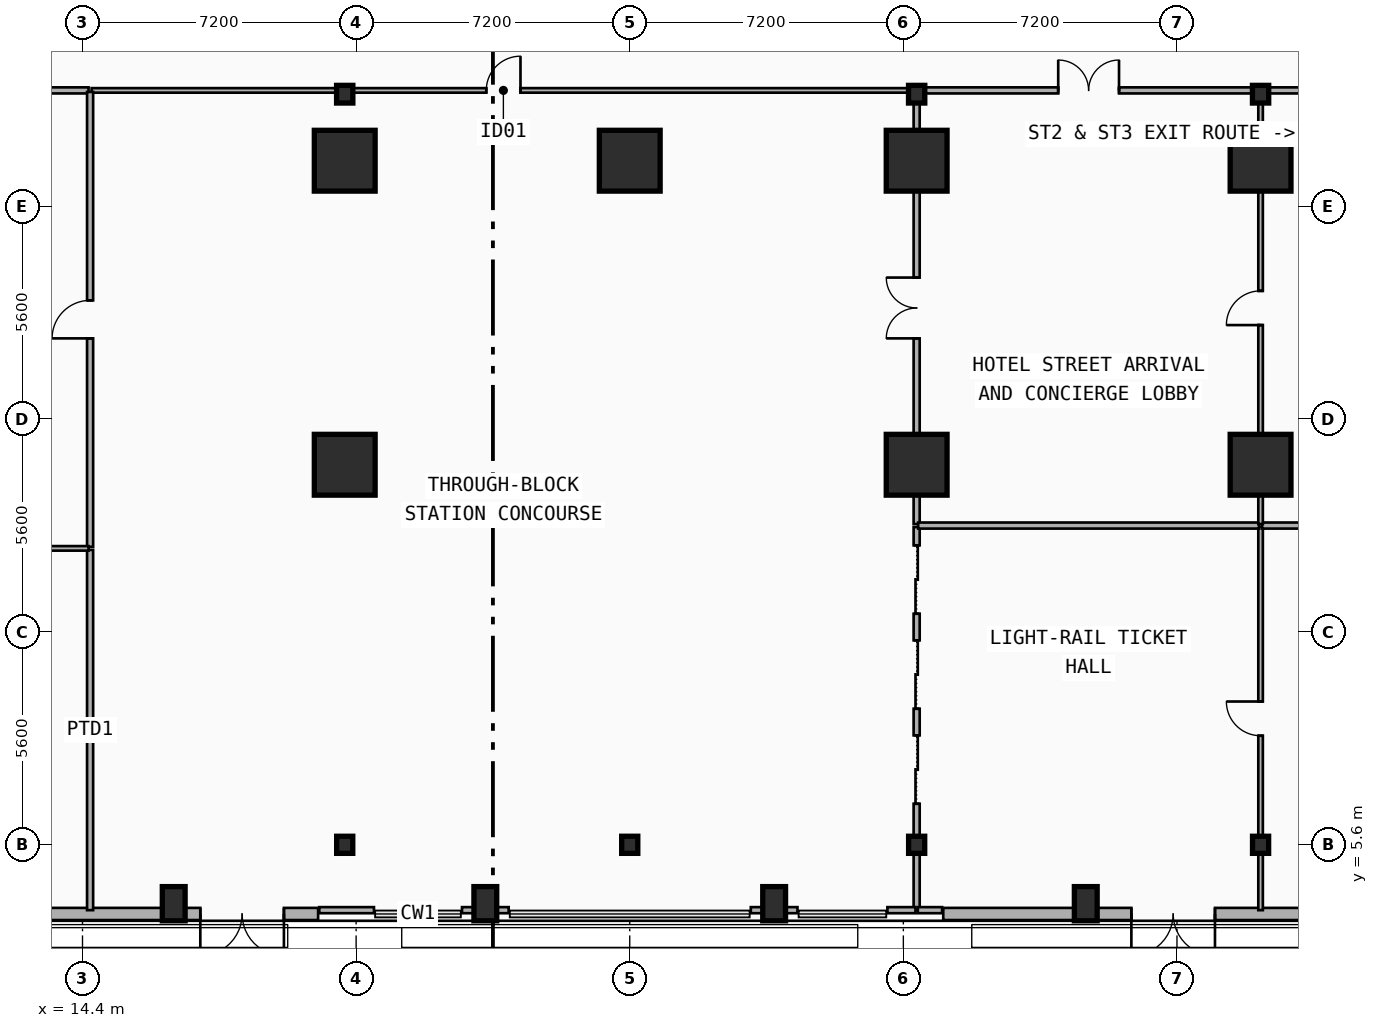
"""IFC4 building model, lengths in metres.
Left out: names, types, materials, properties, quantities, classifications, styles, units other than length and angle.
Written with IfcOpenShell. Run it as: python <this file> out.ifc"""

import sys

from ifc_helpers import new_model, si_unit, direction, frame, frame_2d, origin, origin_2d, place, context, subcontext, project, spatial, rectangle, i_section, extrude, element, fill, save


model = new_model("IFC4")
c1 = context("Model", 3, precision=1e-05, world=origin(), true_north=direction((0.0, 1.0)))
c2 = subcontext(c1, "Body", "Model", "MODEL_VIEW")
j1 = project(units=[si_unit("LENGTHUNIT", "METRE"), si_unit("PLANEANGLEUNIT", "RADIAN")], contexts=[c1])
p1 = place(None, origin())
s1 = spatial("IfcSite", under=j1, at=p1, CompositionType="ELEMENT")
p2 = place(p1, origin())
s2 = spatial("IfcBuilding", under=s1, at=p2, CompositionType="ELEMENT")
p3 = place(p2, origin())
s3 = spatial("IfcBuildingStorey", under=s2, at=p3, CompositionType="ELEMENT", Elevation=0.0)
for number, where, z_axis, x_axis in (
    (1, (21.3, 25.35, 0.0), (0.0, 0.0, 1.0), (1.0, 0.0, 0.0)),
    (2, (36.35, 25.35, 0.0), (0.0, 0.0, 1.0), (1.0, 0.0, 0.0)),
    (3, (45.4, 25.35, 0.0), (0.0, 0.0, 1.0), (1.0, 0.0, 0.0)),
):
    element("IfcColumn", number, at=place(p3, frame(where, z_axis=z_axis, x_axis=x_axis)), inside=s3, PredefinedType="COLUMN", context=c2, shape_type="SweptSolid", body=[
        extrude(i_section(OverallWidth=0.428, OverallDepth=0.465, WebThickness=0.045, FlangeThickness=0.073, FilletRadius=0.015, at=origin_2d()), origin(), (0.0, 0.0, 1.0), 5.4),
    ])
p4 = place(p3, frame((21.3, 5.6, 0.0), z_axis=(0.0, 0.0, 1.0), x_axis=(1.0, 0.0, 0.0)))
e4 = element("IfcColumn", 4, at=p4, inside=s3, PredefinedType="COLUMN", context=c2, shape_type="SweptSolid", body=[
    extrude(i_section(OverallWidth=0.424, OverallDepth=0.45, WebThickness=0.041, FlangeThickness=0.065, FilletRadius=0.015, at=origin_2d()), origin(), (0.0, 0.0, 1.0), 5.4),
])
for number, where, z_axis, x_axis in (
    (5, (21.3, 15.6, 0.0), (0.0, 0.0, 1.0), (1.0, 0.0, 0.0)),
    (6, (21.3, 23.6, 0.0), (0.0, 0.0, 1.0), (1.0, 0.0, 0.0)),
):
    element("IfcColumn", number, at=place(p3, frame(where, z_axis=z_axis, x_axis=x_axis)), inside=s3, PredefinedType="COLUMN", context=c2, shape_type="SweptSolid", body=[
        extrude(rectangle(XDim=1.6, YDim=1.6, at=origin_2d()), origin(), (0.0, 0.0, 1.0), 5.4),
    ])
p5 = place(p3, frame((28.8, 5.6, 0.0), z_axis=(0.0, 0.0, 1.0), x_axis=(1.0, 0.0, 0.0)))
e7 = element("IfcColumn", 7, at=p5, inside=s3, PredefinedType="COLUMN", context=c2, shape_type="SweptSolid", body=[
    extrude(i_section(OverallWidth=0.424, OverallDepth=0.45, WebThickness=0.041, FlangeThickness=0.065, FilletRadius=0.015, at=origin_2d()), origin(), (0.0, 0.0, 1.0), 5.4),
])
p6 = place(p3, frame((28.8, 23.6, 0.0), z_axis=(0.0, 0.0, 1.0), x_axis=(1.0, 0.0, 0.0)))
e8 = element("IfcColumn", 8, at=p6, inside=s3, PredefinedType="COLUMN", context=c2, shape_type="SweptSolid", body=[
    extrude(rectangle(XDim=1.6, YDim=1.6, at=origin_2d()), origin(), (0.0, 0.0, 1.0), 5.4),
])
p7 = place(p3, frame((36.35, 5.6, 0.0), z_axis=(0.0, 0.0, 1.0), x_axis=(1.0, 0.0, 0.0)))
e9 = element("IfcColumn", 9, at=p7, inside=s3, PredefinedType="COLUMN", context=c2, shape_type="SweptSolid", body=[
    extrude(i_section(OverallWidth=0.424, OverallDepth=0.45, WebThickness=0.041, FlangeThickness=0.065, FilletRadius=0.015, at=origin_2d()), origin(), (0.0, 0.0, 1.0), 5.4),
])
for number, where, z_axis, x_axis in (
    (10, (36.35, 15.6, 0.0), (0.0, 0.0, 1.0), (1.0, 0.0, 0.0)),
    (11, (36.35, 23.6, 0.0), (0.0, 0.0, 1.0), (1.0, 0.0, 0.0)),
):
    element("IfcColumn", number, at=place(p3, frame(where, z_axis=z_axis, x_axis=x_axis)), inside=s3, PredefinedType="COLUMN", context=c2, shape_type="SweptSolid", body=[
        extrude(rectangle(XDim=1.6, YDim=1.6, at=origin_2d()), origin(), (0.0, 0.0, 1.0), 5.4),
    ])
p8 = place(p3, frame((45.4, 5.6, 0.0), z_axis=(0.0, 0.0, 1.0), x_axis=(1.0, 0.0, 0.0)))
e12 = element("IfcColumn", 12, at=p8, inside=s3, PredefinedType="COLUMN", context=c2, shape_type="SweptSolid", body=[
    extrude(i_section(OverallWidth=0.424, OverallDepth=0.45, WebThickness=0.041, FlangeThickness=0.065, FilletRadius=0.015, at=origin_2d()), origin(), (0.0, 0.0, 1.0), 5.4),
])
for number, where, z_axis, x_axis in (
    (13, (45.4, 15.6, 0.0), (0.0, 0.0, 1.0), (1.0, 0.0, 0.0)),
    (14, (45.4, 23.6, 0.0), (0.0, 0.0, 1.0), (1.0, 0.0, 0.0)),
):
    element("IfcColumn", number, at=place(p3, frame(where, z_axis=z_axis, x_axis=x_axis)), inside=s3, PredefinedType="COLUMN", context=c2, shape_type="SweptSolid", body=[
        extrude(rectangle(XDim=1.6, YDim=1.6, at=origin_2d()), origin(), (0.0, 0.0, 1.0), 5.4),
    ])
for number, where, z_axis, x_axis in (
    (15, (16.8, 4.05, 0.0), (0.0, 0.0, 1.0), (1.0, 0.0, 0.0)),
    (16, (25.0, 4.05, 0.0), (0.0, 0.0, 1.0), (1.0, 0.0, 0.0)),
    (17, (32.6, 4.05, 0.0), (0.0, 0.0, 1.0), (1.0, 0.0, 0.0)),
    (18, (40.8, 4.05, 0.0), (0.0, 0.0, 1.0), (1.0, 0.0, 0.0)),
):
    element("IfcColumn", number, at=place(p3, frame(where, z_axis=z_axis, x_axis=x_axis)), inside=s3, PredefinedType="PILASTER", context=c2, shape_type="SweptSolid", body=[
        extrude(rectangle(XDim=0.6, YDim=0.9, at=origin_2d()), origin(), (0.0, 0.0, 1.0), 5.4),
    ])
p9 = place(p3, frame((20.6, 3.78, 0.0), z_axis=(0.0, 0.0, 1.0), x_axis=(-1.0, 0.0, 0.0)))
e19 = element("IfcWall", 19, at=p9, inside=s3, PredefinedType="SOLIDWALL", context=c2, shape_type="SweptSolid", body=[
    extrude(rectangle(XDim=17.0, YDim=0.32, at=frame_2d((8.5, 0.0))), origin(), (0.0, 0.0, 1.0), 4.43),
])
p10 = place(p9, frame((0.9, 0.0, 0.0)))
e20 = element("IfcOpeningElement", 20, at=p10, cuts=e19, PredefinedType="OPENING", context=c2, shape_type="SweptSolid", body=[
    extrude(rectangle(XDim=2.2, YDim=2.4, at=frame_2d((1.1, 1.2))), frame((0.0, 0.17, 0.0), z_axis=(0.0, -1.0, 0.0), x_axis=(1.0, 0.0, 0.0)), (0.0, 0.0, 1.0), 0.34),
])
p11 = place(p9, frame((8.6, 0.0, 0.0)))
e21 = element("IfcOpeningElement", 21, at=p11, cuts=e19, PredefinedType="OPENING", context=c2, shape_type="SweptSolid", body=[
    extrude(rectangle(XDim=1.8, YDim=2.3, at=frame_2d((0.9, 1.15))), frame((0.0, 0.17, 0.0), z_axis=(0.0, -1.0, 0.0), x_axis=(1.0, 0.0, 0.0)), (0.0, 0.0, 1.0), 0.34),
])
p12 = place(p3, frame((54.0, 3.78, 0.0), z_axis=(0.0, 0.0, 1.0), x_axis=(-1.0, 0.0, 0.0)))
e22 = element("IfcWall", 22, at=p12, inside=s3, PredefinedType="SOLIDWALL", context=c2, shape_type="SweptSolid", body=[
    extrude(rectangle(XDim=16.95, YDim=0.32, at=frame_2d((8.475, 0.0))), origin(), (0.0, 0.0, 1.0), 4.43),
])
p13 = place(p12, frame((2.2, 0.0, 0.0)))
e23 = element("IfcOpeningElement", 23, at=p13, cuts=e22, PredefinedType="OPENING", context=c2, shape_type="SweptSolid", body=[
    extrude(rectangle(XDim=2.2, YDim=2.4, at=frame_2d((1.1, 1.2))), frame((0.0, 0.17, 0.0), z_axis=(0.0, -1.0, 0.0), x_axis=(1.0, 0.0, 0.0)), (0.0, 0.0, 1.0), 0.34),
])
p14 = place(p12, frame((9.8, 0.0, 0.0)))
e24 = element("IfcOpeningElement", 24, at=p14, cuts=e22, PredefinedType="OPENING", context=c2, shape_type="SweptSolid", body=[
    extrude(rectangle(XDim=2.2, YDim=2.4, at=frame_2d((1.1, 1.2))), frame((0.0, 0.17, 0.0), z_axis=(0.0, -1.0, 0.0), x_axis=(1.0, 0.0, 0.0)), (0.0, 0.0, 1.0), 0.34),
])
p15 = place(p3, frame((14.64, 25.45, 0.0), z_axis=(0.0, 0.0, 1.0), x_axis=(1.0, 0.0, 0.0)))
e25 = element("IfcWall", 25, at=p15, inside=s3, PredefinedType="PARTITIONING", context=c2, shape_type="SweptSolid", body=[
    extrude(rectangle(XDim=21.67, YDim=0.12, at=frame_2d((10.835, 0.0))), origin(), (0.0, 0.0, 1.0), 4.266),
])
p16 = place(p15, frame((10.385, 0.0, 0.0)))
e26 = element("IfcOpeningElement", 26, at=p16, cuts=e25, PredefinedType="OPENING", context=c2, shape_type="SweptSolid", body=[
    extrude(rectangle(XDim=0.9, YDim=2.1, at=frame_2d((0.45, 1.05))), frame((0.0, 0.07, 0.0), z_axis=(0.0, -1.0, 0.0), x_axis=(1.0, 0.0, 0.0)), (0.0, 0.0, 1.0), 0.14),
])
p17 = place(p3, frame((36.39, 25.45, 0.0), z_axis=(0.0, 0.0, 1.0), x_axis=(1.0, 0.0, 0.0)))
e27 = element("IfcWall", 27, at=p17, inside=s3, PredefinedType="PARTITIONING", context=c2, shape_type="SweptSolid", body=[
    extrude(rectangle(XDim=8.97, YDim=0.16, at=frame_2d((4.485, 0.0))), origin(), (0.0, 0.0, 1.0), 4.266),
])
p18 = place(p17, frame((3.685, 0.0, 0.0)))
e28 = element("IfcOpeningElement", 28, at=p18, cuts=e27, PredefinedType="OPENING", context=c2, shape_type="SweptSolid", body=[
    extrude(rectangle(XDim=1.6, YDim=2.2, at=frame_2d((0.8, 1.1))), frame((0.0, 0.09, 0.0), z_axis=(0.0, -1.0, 0.0), x_axis=(1.0, 0.0, 0.0)), (0.0, 0.0, 1.0), 0.18),
])
p19 = place(p3, frame((45.44, 25.45, 0.0), z_axis=(0.0, 0.0, 1.0), x_axis=(1.0, 0.0, 0.0)))
e29 = element("IfcWall", 29, at=p19, inside=s3, PredefinedType="PARTITIONING", context=c2, shape_type="SweptSolid", body=[
    extrude(rectangle(XDim=11.88, YDim=0.16, at=frame_2d((5.94, 0.0))), origin(), (0.0, 0.0, 1.0), 4.266),
])
p20 = place(p3, frame((8.84, 25.45, 0.0), z_axis=(0.0, 0.0, 1.0), x_axis=(1.0, 0.0, 0.0)))
e30 = element("IfcWall", 30, at=p20, inside=s3, PredefinedType="PARTITIONING", context=c2, shape_type="SweptSolid", body=[
    extrude(rectangle(XDim=5.72, YDim=0.16, at=frame_2d((2.86, 0.0))), origin(), (0.0, 0.0, 1.0), 4.266),
])
p21 = place(p20, frame((1.25, 0.0, 0.0)))
e31 = element("IfcOpeningElement", 31, at=p21, cuts=e30, PredefinedType="OPENING", context=c2, shape_type="SweptSolid", body=[
    extrude(rectangle(XDim=1.0, YDim=2.15, at=frame_2d((0.5, 1.075))), frame((0.0, 0.09, 0.0), z_axis=(0.0, -1.0, 0.0), x_axis=(1.0, 0.0, 0.0)), (0.0, 0.0, 1.0), 0.18),
])
p22 = place(p3, frame((36.35, 3.88, 0.0), z_axis=(0.0, 0.0, 1.0), x_axis=(0.0, 1.0, 0.0)))
e32 = element("IfcWall", 32, at=p22, inside=s3, PredefinedType="PARTITIONING", context=c2, shape_type="SweptSolid", body=[
    extrude(rectangle(XDim=10.08, YDim=0.16, at=frame_2d((5.04, 0.0))), origin(), (0.0, 0.0, 1.0), 4.266),
])
p23 = place(p22, frame((2.8, 0.0, 0.0)))
e33 = element("IfcOpeningElement", 33, at=p23, cuts=e32, PredefinedType="OPENING", context=c2, shape_type="SweptSolid", body=[
    extrude(rectangle(XDim=1.8, YDim=2.2, at=frame_2d((0.9, 1.1))), frame((0.0, 0.09, 0.0), z_axis=(0.0, -1.0, 0.0), x_axis=(1.0, 0.0, 0.0)), (0.0, 0.0, 1.0), 0.18),
])
p24 = place(p22, frame((5.3, 0.0, 0.0)))
e34 = element("IfcOpeningElement", 34, at=p24, cuts=e32, PredefinedType="OPENING", context=c2, shape_type="SweptSolid", body=[
    extrude(rectangle(XDim=1.8, YDim=2.2, at=frame_2d((0.9, 1.1))), frame((0.0, 0.09, 0.0), z_axis=(0.0, -1.0, 0.0), x_axis=(1.0, 0.0, 0.0)), (0.0, 0.0, 1.0), 0.18),
])
p25 = place(p22, frame((7.8, 0.0, 0.0)))
e35 = element("IfcOpeningElement", 35, at=p25, cuts=e32, PredefinedType="OPENING", context=c2, shape_type="SweptSolid", body=[
    extrude(rectangle(XDim=1.8, YDim=2.2, at=frame_2d((0.9, 1.1))), frame((0.0, 0.09, 0.0), z_axis=(0.0, -1.0, 0.0), x_axis=(1.0, 0.0, 0.0)), (0.0, 0.0, 1.0), 0.18),
])
p26 = place(p3, frame((36.35, 14.04, 0.0), z_axis=(0.0, 0.0, 1.0), x_axis=(0.0, 1.0, 0.0)))
e36 = element("IfcWall", 36, at=p26, inside=s3, PredefinedType="PARTITIONING", context=c2, shape_type="SweptSolid", body=[
    extrude(rectangle(XDim=11.37, YDim=0.16, at=frame_2d((5.685, 0.0))), origin(), (0.0, 0.0, 1.0), 4.072),
])
p27 = place(p26, frame((4.885, 0.0, 0.0)))
e37 = element("IfcOpeningElement", 37, at=p27, cuts=e36, PredefinedType="OPENING", context=c2, shape_type="SweptSolid", body=[
    extrude(rectangle(XDim=1.6, YDim=2.2, at=frame_2d((0.8, 1.1))), frame((0.0, 0.09, 0.0), z_axis=(0.0, -1.0, 0.0), x_axis=(1.0, 0.0, 0.0)), (0.0, 0.0, 1.0), 0.18),
])
p28 = place(p3, frame((14.6, 3.88, 0.0), z_axis=(0.0, 0.0, 1.0), x_axis=(0.0, 1.0, 0.0)))
e38 = element("IfcWall", 38, at=p28, inside=s3, PredefinedType="PARTITIONING", context=c2, shape_type="SweptSolid", body=[
    extrude(rectangle(XDim=9.48, YDim=0.16, at=frame_2d((4.74, 0.0))), origin(), (0.0, 0.0, 1.0), 4.43),
])
p29 = place(p3, frame((14.6, 13.44, 0.0), z_axis=(0.0, 0.0, 1.0), x_axis=(0.0, 1.0, 0.0)))
e39 = element("IfcWall", 39, at=p29, inside=s3, PredefinedType="PARTITIONING", context=c2, shape_type="SweptSolid", body=[
    extrude(rectangle(XDim=11.97, YDim=0.16, at=frame_2d((5.985, 0.0))), origin(), (0.0, 0.0, 1.0), 4.072),
])
p30 = place(p29, frame((5.485, 0.0, 0.0)))
e40 = element("IfcOpeningElement", 40, at=p30, cuts=e39, PredefinedType="OPENING", context=c2, shape_type="SweptSolid", body=[
    extrude(rectangle(XDim=1.0, YDim=2.15, at=frame_2d((0.5, 1.075))), frame((0.0, 0.09, 0.0), z_axis=(0.0, -1.0, 0.0), x_axis=(1.0, 0.0, 0.0)), (0.0, 0.0, 1.0), 0.18),
])
p31 = place(p3, frame((45.4, 3.88, 0.0), z_axis=(0.0, 0.0, 1.0), x_axis=(0.0, 1.0, 0.0)))
e41 = element("IfcWall", 41, at=p31, inside=s3, PredefinedType="PARTITIONING", context=c2, shape_type="SweptSolid", body=[
    extrude(rectangle(XDim=10.08, YDim=0.12, at=frame_2d((5.04, 0.0))), origin(), (0.0, 0.0, 1.0), 4.266),
])
p32 = place(p31, frame((4.59, 0.0, 0.0)))
e42 = element("IfcOpeningElement", 42, at=p32, cuts=e41, PredefinedType="OPENING", context=c2, shape_type="SweptSolid", body=[
    extrude(rectangle(XDim=0.9, YDim=2.1, at=frame_2d((0.45, 1.05))), frame((0.0, 0.07, 0.0), z_axis=(0.0, -1.0, 0.0), x_axis=(1.0, 0.0, 0.0)), (0.0, 0.0, 1.0), 0.14),
])
p33 = place(p3, frame((36.39, 14.0, 0.0), z_axis=(0.0, 0.0, 1.0), x_axis=(1.0, 0.0, 0.0)))
e43 = element("IfcWall", 43, at=p33, inside=s3, PredefinedType="PARTITIONING", context=c2, shape_type="SweptSolid", body=[
    extrude(rectangle(XDim=8.97, YDim=0.16, at=frame_2d((4.485, 0.0))), origin(), (0.0, 0.0, 1.0), 4.266),
])
p34 = place(p3, frame((45.44, 14.0, 0.0), z_axis=(0.0, 0.0, 1.0), x_axis=(1.0, 0.0, 0.0)))
e44 = element("IfcWall", 44, at=p34, inside=s3, PredefinedType="PARTITIONING", context=c2, shape_type="SweptSolid", body=[
    extrude(rectangle(XDim=11.88, YDim=0.16, at=frame_2d((5.94, 0.0))), origin(), (0.0, 0.0, 1.0), 4.266),
])
p35 = place(p3, frame((45.4, 14.04, 0.0), z_axis=(0.0, 0.0, 1.0), x_axis=(0.0, 1.0, 0.0)))
e45 = element("IfcWall", 45, at=p35, inside=s3, PredefinedType="PARTITIONING", context=c2, shape_type="SweptSolid", body=[
    extrude(rectangle(XDim=11.37, YDim=0.12, at=frame_2d((5.685, 0.0))), origin(), (0.0, 0.0, 1.0), 4.072),
])
p36 = place(p35, frame((5.235, 0.0, 0.0)))
e46 = element("IfcOpeningElement", 46, at=p36, cuts=e45, PredefinedType="OPENING", context=c2, shape_type="SweptSolid", body=[
    extrude(rectangle(XDim=0.9, YDim=2.1, at=frame_2d((0.45, 1.05))), frame((0.0, 0.07, 0.0), z_axis=(0.0, -1.0, 0.0), x_axis=(1.0, 0.0, 0.0)), (0.0, 0.0, 1.0), 0.14),
])
p37 = place(p3, frame((8.84, 13.4, 0.0), z_axis=(0.0, 0.0, 1.0), x_axis=(1.0, 0.0, 0.0)))
e47 = element("IfcWall", 47, at=p37, inside=s3, PredefinedType="PARTITIONING", context=c2, shape_type="SweptSolid", body=[
    extrude(rectangle(XDim=5.72, YDim=0.12, at=frame_2d((2.86, 0.0))), origin(), (0.0, 0.0, 1.0), 4.266),
])
p38 = place(p37, frame((0.329, 0.0, 0.0)))
e48 = element("IfcOpeningElement", 48, at=p38, cuts=e47, PredefinedType="OPENING", context=c2, shape_type="SweptSolid", body=[
    extrude(rectangle(XDim=0.9, YDim=2.1, at=frame_2d((0.45, 1.05))), frame((0.0, 0.07, 0.0), z_axis=(0.0, -1.0, 0.0), x_axis=(1.0, 0.0, 0.0)), (0.0, 0.0, 1.0), 0.14),
])
p39 = place(p3, frame((20.63, 3.88, 0.0), z_axis=(0.0, 0.0, 1.0), x_axis=(1.0, 0.0, 0.0)))
e49 = element("IfcWall", 49, at=p39, inside=s3, PredefinedType="PARTITIONING", context=c2, shape_type="SweptSolid", body=[
    extrude(rectangle(XDim=1.44, YDim=0.16, at=frame_2d((0.72, 0.0))), origin(), (0.0, 0.0, 1.0), 4.43),
])
for number, where, z_axis, x_axis in (
    (50, (24.386, 3.88, 0.0), (0.0, 0.0, 1.0), (1.0, 0.0, 0.0)),
    (51, (31.986, 3.88, 0.0), (0.0, 0.0, 1.0), (1.0, 0.0, 0.0)),
):
    element("IfcWall", number, at=place(p3, frame(where, z_axis=z_axis, x_axis=x_axis)), inside=s3, PredefinedType="PARTITIONING", context=c2, shape_type="SweptSolid", body=[
        extrude(rectangle(XDim=1.228, YDim=0.16, at=frame_2d((0.614, 0.0))), origin(), (0.0, 0.0, 1.0), 4.43),
    ])
p40 = place(p3, frame((35.58, 3.88, 0.0), z_axis=(0.0, 0.0, 1.0), x_axis=(1.0, 0.0, 0.0)))
e52 = element("IfcWall", 52, at=p40, inside=s3, PredefinedType="PARTITIONING", context=c2, shape_type="SweptSolid", body=[
    extrude(rectangle(XDim=0.74, YDim=0.16, at=frame_2d((0.37, 0.0))), origin(), (0.0, 0.0, 1.0), 4.43),
])
p41 = place(p3, frame((36.38, 3.88, 0.0), z_axis=(0.0, 0.0, 1.0), x_axis=(1.0, 0.0, 0.0)))
e53 = element("IfcWall", 53, at=p41, inside=s3, PredefinedType="PARTITIONING", context=c2, shape_type="SweptSolid", body=[
    extrude(rectangle(XDim=0.64, YDim=0.16, at=frame_2d((0.32, 0.0))), origin(), (0.0, 0.0, 1.0), 4.43),
])
p42 = place(p10, origin())
e54 = element("IfcDoor", 54, at=p42, inside=s3, OperationType="SINGLE_SWING_LEFT", PredefinedType="DOOR", context=c2, shape_type="SweptSolid", body=[
    extrude(rectangle(XDim=2.2, YDim=2.4, at=frame_2d((1.1, 1.2))), frame((0.0, 0.025, 0.0), z_axis=(0.0, -1.0, 0.0), x_axis=(1.0, 0.0, 0.0)), (0.0, 0.0, 1.0), 0.05),
])
fill(e20, e54)
p43 = place(p14, origin())
e55 = element("IfcDoor", 55, at=p43, inside=s3, OperationType="SINGLE_SWING_LEFT", PredefinedType="DOOR", context=c2, shape_type="SweptSolid", body=[
    extrude(rectangle(XDim=2.2, YDim=2.4, at=frame_2d((1.1, 1.2))), frame((0.0, 0.025, 0.0), z_axis=(0.0, -1.0, 0.0), x_axis=(1.0, 0.0, 0.0)), (0.0, 0.0, 1.0), 0.05),
])
fill(e24, e55)
p44 = place(p16, origin())
e56 = element("IfcDoor", 56, at=p44, inside=s3, OperationType="SINGLE_SWING_RIGHT", PredefinedType="DOOR", context=c2, shape_type="SweptSolid", body=[
    extrude(rectangle(XDim=0.9, YDim=2.1, at=frame_2d((0.45, 1.05))), frame((0.0, 0.025, 0.0), z_axis=(0.0, -1.0, 0.0), x_axis=(1.0, 0.0, 0.0)), (0.0, 0.0, 1.0), 0.05),
])
fill(e26, e56)
p45 = place(p18, origin())
e57 = element("IfcDoor", 57, at=p45, inside=s3, OperationType="SINGLE_SWING_LEFT", PredefinedType="DOOR", context=c2, shape_type="SweptSolid", body=[
    extrude(rectangle(XDim=1.6, YDim=2.2, at=frame_2d((0.8, 1.1))), frame((0.0, 0.025, 0.0), z_axis=(0.0, -1.0, 0.0), x_axis=(1.0, 0.0, 0.0)), (0.0, 0.0, 1.0), 0.05),
])
fill(e28, e57)
p46 = place(p23, origin())
e58 = element("IfcDoor", 58, at=p46, inside=s3, OperationType="DOUBLE_DOOR_SLIDING", PredefinedType="GATE", context=c2, shape_type="SweptSolid", body=[
    extrude(rectangle(XDim=1.8, YDim=2.2, at=frame_2d((0.9, 1.1))), frame((0.0, 0.025, 0.0), z_axis=(0.0, -1.0, 0.0), x_axis=(1.0, 0.0, 0.0)), (0.0, 0.0, 1.0), 0.05),
])
fill(e33, e58)
p47 = place(p24, origin())
e59 = element("IfcDoor", 59, at=p47, inside=s3, OperationType="DOUBLE_DOOR_SLIDING", PredefinedType="GATE", context=c2, shape_type="SweptSolid", body=[
    extrude(rectangle(XDim=1.8, YDim=2.2, at=frame_2d((0.9, 1.1))), frame((0.0, 0.025, 0.0), z_axis=(0.0, -1.0, 0.0), x_axis=(1.0, 0.0, 0.0)), (0.0, 0.0, 1.0), 0.05),
])
fill(e34, e59)
p48 = place(p25, origin())
e60 = element("IfcDoor", 60, at=p48, inside=s3, OperationType="DOUBLE_DOOR_SLIDING", PredefinedType="GATE", context=c2, shape_type="SweptSolid", body=[
    extrude(rectangle(XDim=1.8, YDim=2.2, at=frame_2d((0.9, 1.1))), frame((0.0, 0.025, 0.0), z_axis=(0.0, -1.0, 0.0), x_axis=(1.0, 0.0, 0.0)), (0.0, 0.0, 1.0), 0.05),
])
fill(e35, e60)
p49 = place(p27, origin())
e61 = element("IfcDoor", 61, at=p49, inside=s3, OperationType="SINGLE_SWING_LEFT", PredefinedType="DOOR", context=c2, shape_type="SweptSolid", body=[
    extrude(rectangle(XDim=1.6, YDim=2.2, at=frame_2d((0.8, 1.1))), frame((0.0, 0.025, 0.0), z_axis=(0.0, -1.0, 0.0), x_axis=(1.0, 0.0, 0.0)), (0.0, 0.0, 1.0), 0.05),
])
fill(e37, e61)
p50 = place(p30, origin())
e62 = element("IfcDoor", 62, at=p50, inside=s3, OperationType="SINGLE_SWING_LEFT", PredefinedType="DOOR", context=c2, shape_type="SweptSolid", body=[
    extrude(rectangle(XDim=1.0, YDim=2.15, at=frame_2d((0.5, 1.075))), frame((0.0, 0.025, 0.0), z_axis=(0.0, -1.0, 0.0), x_axis=(1.0, 0.0, 0.0)), (0.0, 0.0, 1.0), 0.05),
])
fill(e40, e62)
p51 = place(p32, origin())
e63 = element("IfcDoor", 63, at=p51, inside=s3, OperationType="SINGLE_SWING_RIGHT", PredefinedType="DOOR", context=c2, shape_type="SweptSolid", body=[
    extrude(rectangle(XDim=0.9, YDim=2.1, at=frame_2d((0.45, 1.05))), frame((0.0, 0.025, 0.0), z_axis=(0.0, -1.0, 0.0), x_axis=(1.0, 0.0, 0.0)), (0.0, 0.0, 1.0), 0.05),
])
fill(e42, e63)
p52 = place(p36, origin())
e64 = element("IfcDoor", 64, at=p52, inside=s3, OperationType="SINGLE_SWING_LEFT", PredefinedType="DOOR", context=c2, shape_type="SweptSolid", body=[
    extrude(rectangle(XDim=0.9, YDim=2.1, at=frame_2d((0.45, 1.05))), frame((0.0, 0.025, 0.0), z_axis=(0.0, -1.0, 0.0), x_axis=(1.0, 0.0, 0.0)), (0.0, 0.0, 1.0), 0.05),
])
fill(e46, e64)
save(model, sys.argv[1])
